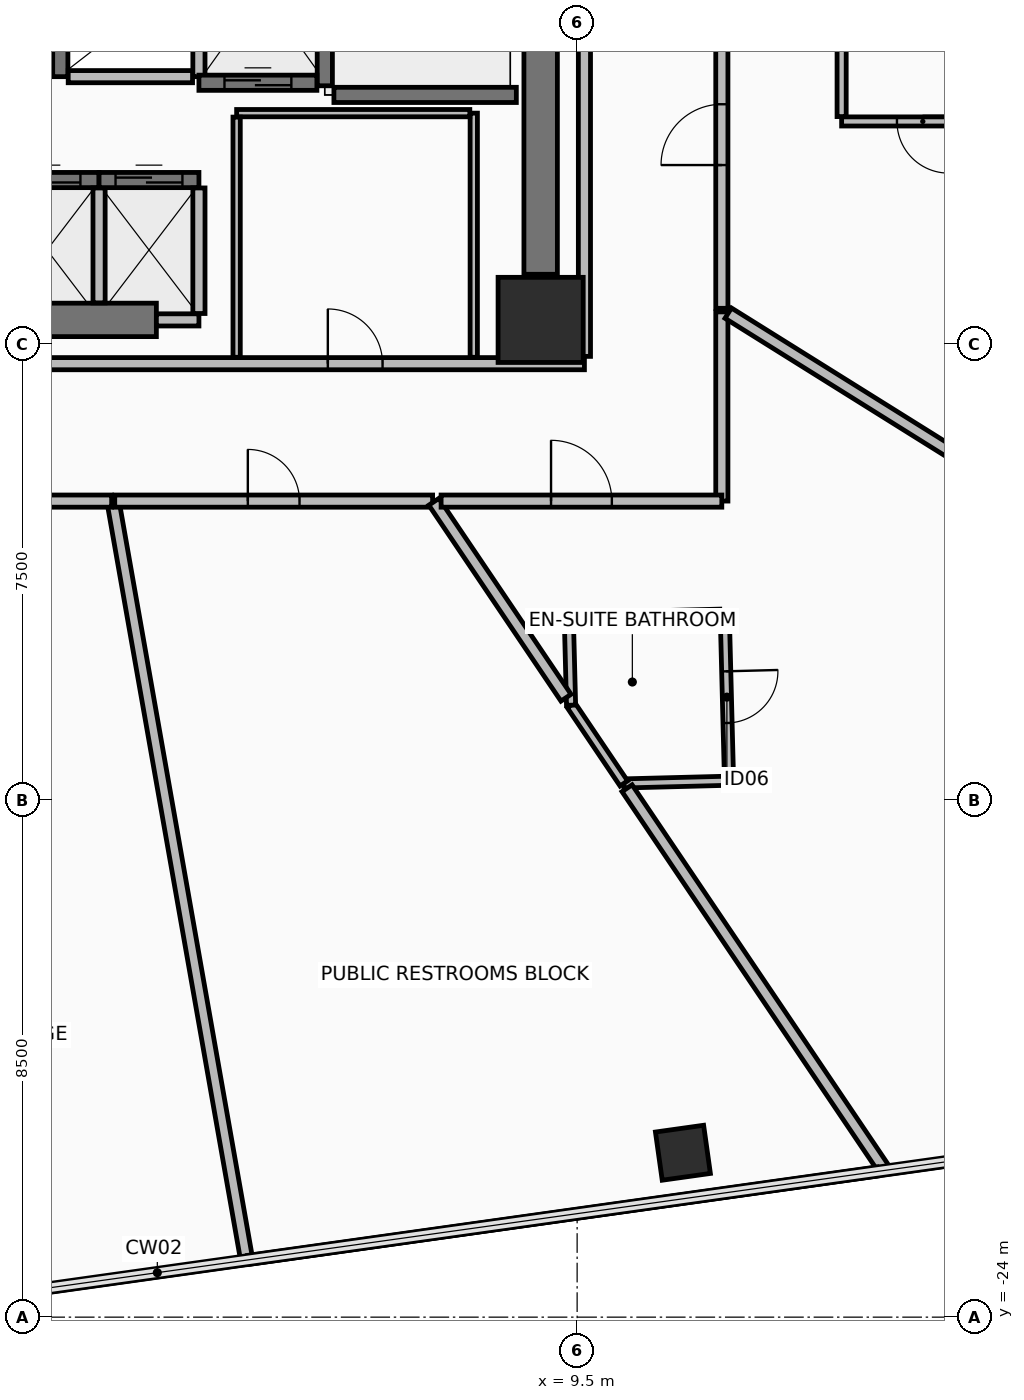
"""IFC4 building model, lengths in metres.
Left out: names, types, materials, properties, quantities, classifications, styles, units other than length and angle.
Written with IfcOpenShell. Run it as: python <this file> out.ifc"""

import sys

from ifc_helpers import new_model, si_unit, direction, frame, frame_2d, origin, origin_2d, place, context, subcontext, project, spatial, rectangle, hollow_rectangle, extrude, element, fill, save


model = new_model("IFC4")
c1 = context("Model", 3, precision=1e-05, world=origin(), true_north=direction((0.0, 1.0)))
c2 = subcontext(c1, "Body", "Model", "MODEL_VIEW")
j1 = project(units=[si_unit("LENGTHUNIT", "METRE"), si_unit("PLANEANGLEUNIT", "RADIAN")], contexts=[c1])
p1 = place(None, origin())
s1 = spatial("IfcSite", under=j1, at=p1, CompositionType="ELEMENT")
p2 = place(p1, origin())
s2 = spatial("IfcBuilding", under=s1, at=p2, CompositionType="ELEMENT")
p3 = place(p2, frame((0.0, 0.0, 77.65)))
s3 = spatial("IfcBuildingStorey", under=s2, at=p3, CompositionType="ELEMENT", Elevation=77.65)
p4 = place(p3, frame((8.9, -7.6, 0.0), z_axis=(0.0, 0.0, 1.0), x_axis=(1.0, 0.0, 0.0)))
e1 = element("IfcColumn", 1, at=p4, inside=s3, PredefinedType="COLUMN", context=c2, shape_type="SweptSolid", body=[
    extrude(rectangle(XDim=1.4, YDim=1.4, at=origin_2d()), origin(), (0.0, 0.0, 1.0), 3.45),
])
p5 = place(p3, frame((11.24, -21.296, 0.0), z_axis=(0.0, 0.0, 1.0), x_axis=(0.990268068742, 0.13917310096, 0.0)))
e2 = element("IfcColumn", 2, at=p5, inside=s3, PredefinedType="COLUMN", context=c2, shape_type="SweptSolid", body=[
    extrude(hollow_rectangle(XDim=0.8, YDim=0.8, WallThickness=0.045, at=origin_2d()), origin(), (0.0, 0.0, 1.0), 3.45),
])
p6 = place(p3, frame((-2.8, -7.6, 0.0), z_axis=(0.0, 0.0, 1.0), x_axis=(1.0, 0.0, 0.0)))
e3 = element("IfcWall", 3, at=p6, inside=s3, PredefinedType="SHEAR", context=c2, shape_type="SweptSolid", body=[
    extrude(rectangle(XDim=5.38, YDim=0.55, at=frame_2d((2.69, 0.0))), origin(), (0.0, 0.0, 1.0), 3.21),
])
p7 = place(p3, frame((8.9, -6.85, 0.0), z_axis=(0.0, 0.0, 1.0), x_axis=(0.0, 1.0, 0.0)))
e4 = element("IfcWall", 4, at=p7, inside=s3, PredefinedType="SHEAR", context=c2, shape_type="SweptSolid", body=[
    extrude(rectangle(XDim=10.7, YDim=0.55, at=frame_2d((5.35, 0.0))), origin(), (0.0, 0.0, 1.0), 3.21),
])
p8 = place(p3, frame((-9.62, -8.32, 0.0), z_axis=(0.0, 0.0, 1.0), x_axis=(1.0, 0.0, 0.0)))
e5 = element("IfcWall", 5, at=p8, inside=s3, PredefinedType="PARTITIONING", context=c2, shape_type="SweptSolid", body=[
    extrude(rectangle(XDim=19.24, YDim=0.2, at=frame_2d((9.62, 0.0))), origin(), (0.0, 0.0, 1.0), 2.605),
])
p9 = place(p8, frame((15.02, 0.0, 0.0)))
e6 = element("IfcOpeningElement", 6, at=p9, cuts=e5, PredefinedType="OPENING", context=c2, shape_type="SweptSolid", body=[
    extrude(rectangle(XDim=0.9, YDim=2.1, at=frame_2d((0.45, 1.05))), frame((0.0, 0.11, 0.0), z_axis=(0.0, -1.0, 0.0), x_axis=(1.0, 0.0, 0.0)), (0.0, 0.0, 1.0), 0.22),
])
p10 = place(p3, frame((9.62, -8.2, 0.0), z_axis=(0.0, 0.0, 1.0), x_axis=(0.0, 1.0, 0.0)))
e7 = element("IfcWall", 7, at=p10, inside=s3, PredefinedType="PARTITIONING", context=c2, shape_type="SweptSolid", body=[
    extrude(rectangle(XDim=16.4, YDim=0.2, at=frame_2d((8.2, 0.0))), origin(), (0.0, 0.0, 1.0), 2.605),
])
p11 = place(p10, frame((12.65, 0.0, 0.0)))
e8 = element("IfcOpeningElement", 8, at=p11, cuts=e7, PredefinedType="OPENING", context=c2, shape_type="SweptSolid", body=[
    extrude(rectangle(XDim=1.1, YDim=2.15, at=frame_2d((0.55, 1.075))), frame((0.0, 0.11, 0.0), z_axis=(0.0, -1.0, 0.0), x_axis=(1.0, 0.0, 0.0)), (0.0, 0.0, 1.0), 0.22),
])
p12 = place(p3, frame((5.35, -3.75, 0.0), z_axis=(0.0, 0.0, 1.0), x_axis=(0.0, 1.0, 0.0)))
e9 = element("IfcWall", 9, at=p12, inside=s3, PredefinedType="SHEAR", context=c2, shape_type="SweptSolid", body=[
    extrude(rectangle(XDim=7.3, YDim=0.25, at=frame_2d((3.65, 0.0))), origin(), (0.0, 0.0, 1.0), 3.21),
])
p13 = place(p3, frame((5.5, -3.9, 0.0), z_axis=(0.0, 0.0, 1.0), x_axis=(1.0, 0.0, 0.0)))
e10 = element("IfcWall", 10, at=p13, inside=s3, PredefinedType="SHEAR", context=c2, shape_type="SweptSolid", body=[
    extrude(rectangle(XDim=3.0, YDim=0.25, at=frame_2d((1.5, 0.0))), origin(), (0.0, 0.0, 1.0), 3.21),
])
p14 = place(p3, frame((-0.075, -5.3, 0.0), z_axis=(0.0, 0.0, 1.0), x_axis=(1.0, 0.0, 0.0)))
e11 = element("IfcWall", 11, at=p14, inside=s3, PredefinedType="SHEAR", context=c2, shape_type="SweptSolid", body=[
    extrude(rectangle(XDim=1.712, YDim=0.25, at=frame_2d((0.856, 0.0))), origin(), (0.0, 0.0, 1.0), 3.21),
])
p15 = place(p14, frame((0.306, 0.0, 0.0)))
e12 = element("IfcOpeningElement", 12, at=p15, cuts=e11, PredefinedType="OPENING", context=c2, shape_type="SweptSolid", body=[
    extrude(rectangle(XDim=1.1, YDim=2.2, at=frame_2d((0.55, 1.1))), frame((0.0, 0.135, 0.0), z_axis=(0.0, -1.0, 0.0), x_axis=(1.0, 0.0, 0.0)), (0.0, 0.0, 1.0), 0.27),
])
p16 = place(p3, frame((1.637, -7.32, 0.0), z_axis=(0.0, 0.0, 1.0), x_axis=(0.0, 1.0, 0.0)))
e13 = element("IfcWall", 13, at=p16, inside=s3, PredefinedType="PARTITIONING", context=c2, shape_type="SweptSolid", body=[
    extrude(rectangle(XDim=1.89, YDim=0.2, at=frame_2d((0.945, 0.0))), origin(), (0.0, 0.0, 1.0), 3.21),
])
p17 = place(p3, frame((1.637, -5.3, 0.0), z_axis=(0.0, 0.0, 1.0), x_axis=(1.0, 0.0, 0.0)))
e14 = element("IfcWall", 14, at=p17, inside=s3, PredefinedType="SHEAR", context=c2, shape_type="SweptSolid", body=[
    extrude(rectangle(XDim=1.643, YDim=0.25, at=frame_2d((0.821, 0.0))), origin(), (0.0, 0.0, 1.0), 3.21),
])
p18 = place(p17, frame((0.271, 0.0, 0.0)))
e15 = element("IfcOpeningElement", 15, at=p18, cuts=e14, PredefinedType="OPENING", context=c2, shape_type="SweptSolid", body=[
    extrude(rectangle(XDim=1.1, YDim=2.2, at=frame_2d((0.55, 1.1))), frame((0.0, 0.135, 0.0), z_axis=(0.0, -1.0, 0.0), x_axis=(1.0, 0.0, 0.0)), (0.0, 0.0, 1.0), 0.27),
])
p19 = place(p3, frame((2.58, -7.6, 0.0), z_axis=(0.0, 0.0, 1.0), x_axis=(1.0, 0.0, 0.0)))
e16 = element("IfcWall", 16, at=p19, inside=s3, PredefinedType="PARTITIONING", context=c2, shape_type="SweptSolid", body=[
    extrude(rectangle(XDim=0.7, YDim=0.2, at=frame_2d((0.35, 0.0))), origin(), (0.0, 0.0, 1.0), 2.405),
])
p20 = place(p3, frame((3.28, -7.495, 0.0), z_axis=(0.0, 0.0, 1.0), x_axis=(0.0, 1.0, 0.0)))
e17 = element("IfcWall", 17, at=p20, inside=s3, PredefinedType="PARTITIONING", context=c2, shape_type="SweptSolid", body=[
    extrude(rectangle(XDim=2.065, YDim=0.2, at=frame_2d((1.033, 0.0))), origin(), (0.0, 0.0, 1.0), 2.405),
])
p21 = place(p3, frame((1.0, -3.6, 0.0), z_axis=(0.0, 0.0, 1.0), x_axis=(0.0, 1.0, 0.0)))
e18 = element("IfcWall", 18, at=p21, inside=s3, PredefinedType="SHEAR", context=c2, shape_type="SweptSolid", body=[
    extrude(rectangle(XDim=1.8, YDim=0.25, at=frame_2d((0.9, 0.0))), origin(), (0.0, 0.0, 1.0), 3.21),
])
p22 = place(p3, frame((3.28, -3.6, 0.0), z_axis=(0.0, 0.0, 1.0), x_axis=(0.0, 1.0, 0.0)))
e19 = element("IfcWall", 19, at=p22, inside=s3, PredefinedType="PARTITIONING", context=c2, shape_type="SweptSolid", body=[
    extrude(rectangle(XDim=1.8, YDim=0.2, at=frame_2d((0.9, 0.0))), origin(), (0.0, 0.0, 1.0), 3.21),
])
p23 = place(p3, frame((1.13, -3.6, 0.0), z_axis=(0.0, 0.0, 1.0), x_axis=(1.0, 0.0, 0.0)))
e20 = element("IfcWall", 20, at=p23, inside=s3, PredefinedType="PARTITIONING", context=c2, shape_type="SweptSolid", body=[
    extrude(rectangle(XDim=2.045, YDim=0.2, at=frame_2d((1.022, 0.0))), origin(), (0.0, 0.0, 1.0), 3.21),
])
p24 = place(p3, frame((3.28, -3.7, 0.0), z_axis=(0.0, 0.0, 1.0), x_axis=(1.0, 0.0, 0.0)))
e21 = element("IfcWall", 21, at=p24, inside=s3, PredefinedType="SHEAR", context=c2, shape_type="SweptSolid", body=[
    extrude(rectangle(XDim=1.94, YDim=0.25, at=frame_2d((0.97, 0.0))), origin(), (0.0, 0.0, 1.0), 3.21),
])
p25 = place(p24, frame((0.42, 0.0, 0.0)))
e22 = element("IfcOpeningElement", 22, at=p25, cuts=e21, PredefinedType="OPENING", context=c2, shape_type="SweptSolid", body=[
    extrude(rectangle(XDim=1.1, YDim=2.2, at=frame_2d((0.55, 1.1))), frame((0.0, 0.135, 0.0), z_axis=(0.0, -1.0, 0.0), x_axis=(1.0, 0.0, 0.0)), (0.0, 0.0, 1.0), 0.27),
])
p26 = place(p3, frame((7.8, -8.215, 0.0), z_axis=(0.0, 0.0, 1.0), x_axis=(0.0, 1.0, 0.0)))
e23 = element("IfcWall", 23, at=p26, inside=s3, PredefinedType="PARTITIONING", context=c2, shape_type="SweptSolid", body=[
    extrude(rectangle(XDim=4.015, YDim=0.12, at=frame_2d((2.008, 0.0))), origin(), (0.0, 0.0, 1.0), 2.405),
])
p27 = place(p3, frame((7.735, -4.2, 0.0), z_axis=(0.0, 0.0, 1.0), x_axis=(-1.0, 0.0, 0.0)))
e24 = element("IfcWall", 24, at=p27, inside=s3, PredefinedType="PARTITIONING", context=c2, shape_type="SweptSolid", body=[
    extrude(rectangle(XDim=3.835, YDim=0.12, at=frame_2d((1.917, 0.0))), origin(), (0.0, 0.0, 1.0), 3.21),
])
p28 = place(p3, frame((3.9, -4.265, 0.0), z_axis=(0.0, 0.0, 1.0), x_axis=(0.0, -1.0, 0.0)))
e25 = element("IfcWall", 25, at=p28, inside=s3, PredefinedType="PARTITIONING", context=c2, shape_type="SweptSolid", body=[
    extrude(rectangle(XDim=3.95, YDim=0.12, at=frame_2d((1.975, 0.0))), origin(), (0.0, 0.0, 1.0), 2.405),
])
p29 = place(p3, frame((11.927, -12.429, 0.0), z_axis=(0.0, 0.0, 1.0), x_axis=(0.025746347005, -0.999668507864, 0.0)))
e26 = element("IfcWall", 26, at=p29, inside=s3, PredefinedType="PARTITIONING", context=c2, shape_type="SweptSolid", body=[
    extrude(rectangle(XDim=2.75, YDim=0.15, at=frame_2d((1.375, 0.0))), origin(), (0.0, 0.0, 1.0), 2.805),
])
p30 = place(p29, frame((0.95, 0.0, 0.0)))
e27 = element("IfcOpeningElement", 27, at=p30, cuts=e26, PredefinedType="OPENING", context=c2, shape_type="SweptSolid", body=[
    extrude(rectangle(XDim=0.85, YDim=2.1, at=frame_2d((0.425, 1.05))), frame((0.0, 0.085, 0.0), z_axis=(0.0, -1.0, 0.0), x_axis=(1.0, 0.0, 0.0)), (0.0, 0.0, 1.0), 0.17),
])
p31 = place(p3, frame((11.998, -15.178, 0.0), z_axis=(0.0, 0.0, 1.0), x_axis=(-0.999670410654, -0.025672359918, 0.0)))
e28 = element("IfcWall", 28, at=p31, inside=s3, PredefinedType="PARTITIONING", context=c2, shape_type="SweptSolid", body=[
    extrude(rectangle(XDim=1.731, YDim=0.15, at=frame_2d((0.865, 0.0))), origin(), (0.0, 0.0, 1.0), 2.605),
])
p32 = place(p3, frame((10.268, -15.223, 0.0), z_axis=(0.0, 0.0, 1.0), x_axis=(-0.559229675695, 0.82901276819, 0.0)))
e29 = element("IfcWall", 29, at=p32, inside=s3, PredefinedType="PARTITIONING", context=c2, shape_type="SweptSolid", body=[
    extrude(rectangle(XDim=1.552, YDim=0.15, at=frame_2d((0.776, 0.0))), origin(), (0.0, 0.0, 1.0), 2.605),
])
p33 = place(p3, frame((9.4, -13.936, 0.0), z_axis=(0.0, 0.0, 1.0), x_axis=(-0.025745445057, 0.999668531094, 0.0)))
e30 = element("IfcWall", 30, at=p33, inside=s3, PredefinedType="PARTITIONING", context=c2, shape_type="SweptSolid", body=[
    extrude(rectangle(XDim=1.441, YDim=0.15, at=frame_2d((0.721, 0.0))), origin(), (0.0, 0.0, 1.0), 3.21),
])
p34 = place(p3, frame((9.443, -12.493, 0.0), z_axis=(0.0, 0.0, 1.0), x_axis=(0.999667618691, 0.025780848324, 0.0)))
e31 = element("IfcWall", 31, at=p34, inside=s3, PredefinedType="PARTITIONING", context=c2, shape_type="SweptSolid", body=[
    extrude(rectangle(XDim=2.405, YDim=0.15, at=frame_2d((1.203, 0.0))), origin(), (0.0, 0.0, 1.0), 2.605),
])
p35 = place(p3, frame((16.52, -4.336, 0.0), z_axis=(0.0, 0.0, 1.0), x_axis=(-1.0, 0.0, 0.0)))
e32 = element("IfcWall", 32, at=p35, inside=s3, PredefinedType="PARTITIONING", context=c2, shape_type="SweptSolid", body=[
    extrude(rectangle(XDim=2.67, YDim=0.15, at=frame_2d((1.335, 0.0))), origin(), (0.0, 0.0, 1.0), 2.605),
])
p36 = place(p35, frame((0.91, 0.0, 0.0)))
e33 = element("IfcOpeningElement", 33, at=p36, cuts=e32, PredefinedType="OPENING", context=c2, shape_type="SweptSolid", body=[
    extrude(rectangle(XDim=0.85, YDim=2.1, at=frame_2d((0.425, 1.05))), frame((0.0, 0.085, 0.0), z_axis=(0.0, -1.0, 0.0), x_axis=(1.0, 0.0, 0.0)), (0.0, 0.0, 1.0), 0.17),
])
p37 = place(p3, frame((13.85, -4.257, 0.0), z_axis=(0.0, 0.0, 1.0), x_axis=(0.0, 1.0, 0.0)))
e34 = element("IfcWall", 34, at=p37, inside=s3, PredefinedType="PARTITIONING", context=c2, shape_type="SweptSolid", body=[
    extrude(rectangle(XDim=2.229, YDim=0.15, at=frame_2d((1.115, 0.0))), origin(), (0.0, 0.0, 1.0), 2.805),
])
p38 = place(p3, frame((4.062, -23.038, 0.0), z_axis=(0.0, 0.0, 1.0), x_axis=(-0.173658422676, 0.984805946486, 0.0)))
e35 = element("IfcWall", 35, at=p38, inside=s3, PredefinedType="PARTITIONING", context=c2, shape_type="SweptSolid", body=[
    extrude(rectangle(XDim=12.62, YDim=0.2, at=frame_2d((6.31, 0.0))), origin(), (0.0, 0.0, 1.0), 2.405),
])
p39 = place(p3, frame((1.895, -10.58, 0.0), z_axis=(0.0, 0.0, 1.0), x_axis=(1.0, 0.0, 0.0)))
e36 = element("IfcWall", 36, at=p39, inside=s3, PredefinedType="PARTITIONING", context=c2, shape_type="SweptSolid", body=[
    extrude(rectangle(XDim=5.228, YDim=0.2, at=frame_2d((2.614, 0.0))), origin(), (0.0, 0.0, 1.0), 3.21),
])
p40 = place(p39, frame((2.189, 0.0, 0.0)))
e37 = element("IfcOpeningElement", 37, at=p40, cuts=e36, PredefinedType="OPENING", context=c2, shape_type="SweptSolid", body=[
    extrude(rectangle(XDim=0.85, YDim=2.1, at=frame_2d((0.425, 1.05))), frame((0.0, 0.11, 0.0), z_axis=(0.0, -1.0, 0.0), x_axis=(1.0, 0.0, 0.0)), (0.0, 0.0, 1.0), 0.22),
])
p41 = place(p3, frame((7.144, -10.591, 0.0), z_axis=(0.0, 0.0, 1.0), x_axis=(0.559171794076, -0.829051810631, 0.0)))
e38 = element("IfcWall", 38, at=p41, inside=s3, PredefinedType="PARTITIONING", context=c2, shape_type="SweptSolid", body=[
    extrude(rectangle(XDim=3.886, YDim=0.2, at=frame_2d((1.943, 0.0))), origin(), (0.0, 0.0, 1.0), 3.21),
])
p42 = place(p3, frame((10.321, -15.302, 0.0), z_axis=(0.0, 0.0, 1.0), x_axis=(0.559202924042, -0.829030813506, 0.0)))
e39 = element("IfcWall", 39, at=p42, inside=s3, PredefinedType="PARTITIONING", context=c2, shape_type="SweptSolid", body=[
    extrude(rectangle(XDim=7.581, YDim=0.2, at=frame_2d((3.791, 0.0))), origin(), (0.0, 0.0, 1.0), 2.405),
])
p43 = place(p3, frame((14.445, -21.603, 0.0), z_axis=(0.0, 0.0, 1.0), x_axis=(-0.990270056923, -0.139158953581, 0.0)))
e40 = element("IfcWall", 40, at=p43, inside=s3, PredefinedType="PARTITIONING", context=c2, shape_type="SweptSolid", body=[
    extrude(rectangle(XDim=10.456, YDim=0.15, at=frame_2d((5.228, 0.0))), origin(), (0.0, 0.0, 1.0), 3.21),
])
p44 = place(p3, frame((-2.618, -10.58, 0.0), z_axis=(0.0, 0.0, 1.0), x_axis=(1.0, 0.0, 0.0)))
e41 = element("IfcWall", 41, at=p44, inside=s3, PredefinedType="PARTITIONING", context=c2, shape_type="SweptSolid", body=[
    extrude(rectangle(XDim=4.463, YDim=0.2, at=frame_2d((2.231, 0.0))), origin(), (0.0, 0.0, 1.0), 3.21),
])
p45 = place(p44, frame((1.631, 0.0, 0.0)))
e42 = element("IfcOpeningElement", 42, at=p45, cuts=e41, PredefinedType="OPENING", context=c2, shape_type="SweptSolid", body=[
    extrude(rectangle(XDim=1.2, YDim=2.15, at=frame_2d((0.6, 1.075))), frame((0.0, 0.11, 0.0), z_axis=(0.0, -1.0, 0.0), x_axis=(1.0, 0.0, 0.0)), (0.0, 0.0, 1.0), 0.22),
])
p46 = place(p3, frame((11.88, -10.579, 0.0), z_axis=(0.0, 0.0, 1.0), x_axis=(0.0, 1.0, 0.0)))
e43 = element("IfcWall", 43, at=p46, inside=s3, PredefinedType="PARTITIONING", context=c2, shape_type="SweptSolid", body=[
    extrude(rectangle(XDim=3.111, YDim=0.2, at=frame_2d((1.555, 0.0))), origin(), (0.0, 0.0, 1.0), 2.605),
])
p47 = place(p3, frame((11.985, -7.489, 0.0), z_axis=(0.0, 0.0, 1.0), x_axis=(0.848049281921, -0.529917366608, 0.0)))
e44 = element("IfcWall", 44, at=p47, inside=s3, PredefinedType="PARTITIONING", context=c2, shape_type="SweptSolid", body=[
    extrude(rectangle(XDim=19.908, YDim=0.2, at=frame_2d((9.954, 0.0))), origin(), (0.0, 0.0, 1.0), 2.405),
])
p48 = place(p3, frame((7.263, -10.58, 0.0), z_axis=(0.0, 0.0, 1.0), x_axis=(1.0, 0.0, 0.0)))
e45 = element("IfcWall", 45, at=p48, inside=s3, PredefinedType="PARTITIONING", context=c2, shape_type="SweptSolid", body=[
    extrude(rectangle(XDim=4.616, YDim=0.2, at=frame_2d((2.308, 0.0))), origin(), (0.0, 0.0, 1.0), 2.605),
])
p49 = place(p48, frame((1.808, 0.0, 0.0)))
e46 = element("IfcOpeningElement", 46, at=p49, cuts=e45, PredefinedType="OPENING", context=c2, shape_type="SweptSolid", body=[
    extrude(rectangle(XDim=1.0, YDim=2.15, at=frame_2d((0.5, 1.075))), frame((0.0, 0.11, 0.0), z_axis=(0.0, -1.0, 0.0), x_axis=(1.0, 0.0, 0.0)), (0.0, 0.0, 1.0), 0.22),
])
p50 = place(p3, frame((11.88, -7.41, 0.0), z_axis=(0.0, 0.0, 1.0), x_axis=(0.0, 1.0, 0.0)))
e47 = element("IfcWall", 47, at=p50, inside=s3, PredefinedType="PARTITIONING", context=c2, shape_type="SweptSolid", body=[
    extrude(rectangle(XDim=5.711, YDim=0.2, at=frame_2d((2.855, 0.0))), origin(), (0.0, 0.0, 1.0), 2.605),
])
p51 = place(p50, frame((2.356, 0.0, 0.0)))
e48 = element("IfcOpeningElement", 48, at=p51, cuts=e47, PredefinedType="OPENING", context=c2, shape_type="SweptSolid", body=[
    extrude(rectangle(XDim=1.0, YDim=2.15, at=frame_2d((0.5, 1.075))), frame((0.0, 0.11, 0.0), z_axis=(0.0, -1.0, 0.0), x_axis=(1.0, 0.0, 0.0)), (0.0, 0.0, 1.0), 0.22),
])
p52 = place(p15, origin())
e49 = element("IfcDoor", 49, at=p52, inside=s3, OperationType="SLIDING_TO_LEFT", PredefinedType="DOOR", context=c2, shape_type="SweptSolid", body=[
    extrude(rectangle(XDim=1.1, YDim=2.2, at=frame_2d((0.55, 1.1))), frame((0.0, 0.025, 0.0), z_axis=(0.0, -1.0, 0.0), x_axis=(1.0, 0.0, 0.0)), (0.0, 0.0, 1.0), 0.05),
])
fill(e12, e49)
p53 = place(p18, origin())
e50 = element("IfcDoor", 50, at=p53, inside=s3, OperationType="SLIDING_TO_LEFT", PredefinedType="DOOR", context=c2, shape_type="SweptSolid", body=[
    extrude(rectangle(XDim=1.1, YDim=2.2, at=frame_2d((0.55, 1.1))), frame((0.0, 0.025, 0.0), z_axis=(0.0, -1.0, 0.0), x_axis=(1.0, 0.0, 0.0)), (0.0, 0.0, 1.0), 0.05),
])
fill(e15, e50)
p54 = place(p25, origin())
e51 = element("IfcDoor", 51, at=p54, inside=s3, OperationType="SLIDING_TO_LEFT", PredefinedType="DOOR", context=c2, shape_type="SweptSolid", body=[
    extrude(rectangle(XDim=1.1, YDim=2.2, at=frame_2d((0.55, 1.1))), frame((0.0, 0.025, 0.0), z_axis=(0.0, -1.0, 0.0), x_axis=(1.0, 0.0, 0.0)), (0.0, 0.0, 1.0), 0.05),
])
fill(e22, e51)
p55 = place(p9, origin())
e52 = element("IfcDoor", 52, at=p55, inside=s3, OperationType="SINGLE_SWING_LEFT", PredefinedType="DOOR", context=c2, shape_type="SweptSolid", body=[
    extrude(rectangle(XDim=0.9, YDim=2.1, at=frame_2d((0.45, 1.05))), frame((0.0, 0.025, 0.0), z_axis=(0.0, -1.0, 0.0), x_axis=(1.0, 0.0, 0.0)), (0.0, 0.0, 1.0), 0.05),
])
fill(e6, e52)
p56 = place(p30, origin())
e53 = element("IfcDoor", 53, at=p56, inside=s3, OperationType="SINGLE_SWING_RIGHT", PredefinedType="DOOR", context=c2, shape_type="SweptSolid", body=[
    extrude(rectangle(XDim=0.85, YDim=2.1, at=frame_2d((0.425, 1.05))), frame((0.0, 0.025, 0.0), z_axis=(0.0, -1.0, 0.0), x_axis=(1.0, 0.0, 0.0)), (0.0, 0.0, 1.0), 0.05),
])
fill(e27, e53)
p57 = place(p36, origin())
e54 = element("IfcDoor", 54, at=p57, inside=s3, OperationType="SINGLE_SWING_RIGHT", PredefinedType="DOOR", context=c2, shape_type="SweptSolid", body=[
    extrude(rectangle(XDim=0.85, YDim=2.1, at=frame_2d((0.425, 1.05))), frame((0.0, 0.025, 0.0), z_axis=(0.0, -1.0, 0.0), x_axis=(1.0, 0.0, 0.0)), (0.0, 0.0, 1.0), 0.05),
])
fill(e33, e54)
p58 = place(p40, origin())
e55 = element("IfcDoor", 55, at=p58, inside=s3, OperationType="SINGLE_SWING_RIGHT", PredefinedType="DOOR", context=c2, shape_type="SweptSolid", body=[
    extrude(rectangle(XDim=0.85, YDim=2.1, at=frame_2d((0.425, 1.05))), frame((0.0, 0.025, 0.0), z_axis=(0.0, -1.0, 0.0), x_axis=(1.0, 0.0, 0.0)), (0.0, 0.0, 1.0), 0.05),
])
fill(e37, e55)
p59 = place(p49, origin())
e56 = element("IfcDoor", 56, at=p59, inside=s3, OperationType="SINGLE_SWING_LEFT", PredefinedType="DOOR", context=c2, shape_type="SweptSolid", body=[
    extrude(rectangle(XDim=1.0, YDim=2.15, at=frame_2d((0.5, 1.075))), frame((0.0, 0.025, 0.0), z_axis=(0.0, -1.0, 0.0), x_axis=(1.0, 0.0, 0.0)), (0.0, 0.0, 1.0), 0.05),
])
fill(e46, e56)
p60 = place(p51, origin())
e57 = element("IfcDoor", 57, at=p60, inside=s3, OperationType="SINGLE_SWING_LEFT", PredefinedType="DOOR", context=c2, shape_type="SweptSolid", body=[
    extrude(rectangle(XDim=1.0, YDim=2.15, at=frame_2d((0.5, 1.075))), frame((0.0, 0.025, 0.0), z_axis=(0.0, -1.0, 0.0), x_axis=(1.0, 0.0, 0.0)), (0.0, 0.0, 1.0), 0.05),
])
fill(e48, e57)
save(model, sys.argv[1])
